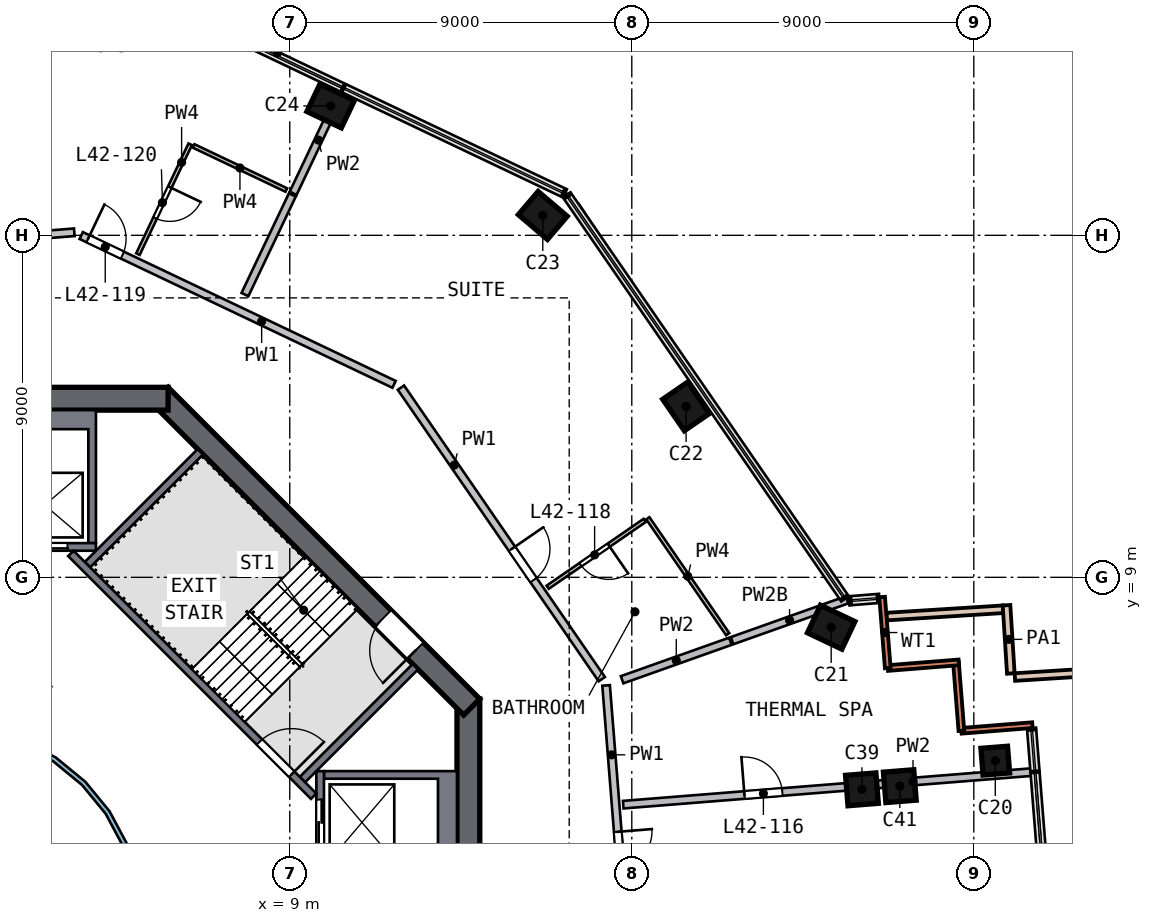
"""IFC4 building model, lengths in metres.
Left out: names, types, materials, properties, quantities, classifications, styles, units other than length and angle.
Written with IfcOpenShell. Run it as: python <this file> out.ifc"""

import sys

from ifc_helpers import new_model, si_unit, direction, frame, frame_2d, origin, origin_2d, place, context, subcontext, project, spatial, polyline, rectangle, outline, extrude, element, fill, save


model = new_model("IFC4")
c1 = context("Model", 3, precision=1e-05, world=origin(), true_north=direction((0.0, 1.0)))
c2 = subcontext(c1, "Body", "Model", "MODEL_VIEW")
j1 = project(units=[si_unit("LENGTHUNIT", "METRE"), si_unit("PLANEANGLEUNIT", "RADIAN")], contexts=[c1])
p1 = place(None, origin())
s1 = spatial("IfcSite", under=j1, at=p1, CompositionType="ELEMENT")
p2 = place(p1, origin())
s2 = spatial("IfcBuilding", under=s1, at=p2, CompositionType="ELEMENT")
p3 = place(p2, frame((0.0, 0.0, 175.0)))
s3 = spatial("IfcBuildingStorey", under=s2, at=p3, CompositionType="ELEMENT", Elevation=175.0)
p4 = place(p3, frame((27.583, 4.066, 0.0), z_axis=(-0.014357066, 0.091895591, 0.995665142), x_axis=(-0.078762263, 0.992569774, -0.09274562)))
e1 = element("IfcColumn", 1, at=p4, inside=s3, PredefinedType="COLUMN", context=c2, shape_type="SweptSolid", body=[
    extrude(rectangle(XDim=0.7, YDim=0.7, at=origin_2d()), origin(), (0.0, 0.0, 1.0), 4.71),
])
p5 = place(p3, frame((23.278, 7.595, 0.0), z_axis=(-0.025992865, 0.077511656, 0.996652554), x_axis=(0.902933505, -0.426026157, 0.05668156)))
e2 = element("IfcColumn", 2, at=p5, inside=s3, PredefinedType="COLUMN", context=c2, shape_type="SweptSolid", body=[
    extrude(rectangle(XDim=1.0, YDim=0.8, at=origin_2d()), origin(), (0.0, 0.0, 1.0), 4.706),
])
p6 = place(p3, frame((19.483, 13.421, 0.0), z_axis=(-0.045354859, 0.064711109, 0.996872815), x_axis=(-0.565250312, 0.821126017, -0.079019933)))
e3 = element("IfcColumn", 3, at=p6, inside=s3, PredefinedType="COLUMN", context=c2, shape_type="SweptSolid", body=[
    extrude(rectangle(XDim=1.0, YDim=0.8, at=origin_2d()), origin(), (0.0, 0.0, 1.0), 4.705),
])
p7 = place(p3, frame((15.733, 18.46, 0.0), z_axis=(-0.062106409, 0.052040708, 0.996711873), x_axis=(0.758540649, -0.646568718, 0.081024549)))
e4 = element("IfcColumn", 4, at=p7, inside=s3, PredefinedType="COLUMN", context=c2, shape_type="SweptSolid", body=[
    extrude(rectangle(XDim=1.0, YDim=0.8, at=origin_2d()), origin(), (0.0, 0.0, 1.0), 4.705),
])
p8 = place(p3, frame((10.163, 21.364, 0.0), z_axis=(-0.071664662, 0.033367399, 0.9968705), x_axis=(-0.90013564, 0.428377245, -0.079049135)))
e5 = element("IfcColumn", 5, at=p8, inside=s3, PredefinedType="COLUMN", context=c2, shape_type="SweptSolid", body=[
    extrude(rectangle(XDim=1.0, YDim=0.8, at=origin_2d()), origin(), (0.0, 0.0, 1.0), 4.705),
])
p9 = place(p3, frame((24.07, 3.324, 0.0), z_axis=(-0.011777813, 0.080265538, 0.996703931), x_axis=(0.996779302, 0.08001601, 0.005334937)))
e6 = element("IfcColumn", 6, at=p9, inside=s3, PredefinedType="COLUMN", context=c2, shape_type="SweptSolid", body=[
    extrude(rectangle(XDim=0.8, YDim=0.8, at=origin_2d()), origin(), (0.0, 0.0, 1.0), 4.706),
])
p10 = place(p3, frame((25.067, 3.404, 0.0), z_axis=(-0.012085789, 0.083563115, 0.996429194), x_axis=(0.996760191, 0.08025208, 0.005359658)))
e7 = element("IfcColumn", 7, at=p10, inside=s3, PredefinedType="COLUMN", context=c2, shape_type="SweptSolid", body=[
    extrude(rectangle(XDim=0.8, YDim=0.8, at=origin_2d()), origin(), (0.0, 0.0, 1.0), 4.707),
])
p11 = place(p3, frame((13.7, -5.799, 0.0), z_axis=(0.0, 0.0, 1.0), x_axis=(0.0, 1.0, 0.0)))
e8 = element("IfcWall", 8, at=p11, inside=s3, PredefinedType="SHEAR", context=c2, shape_type="SweptSolid", body=[
    extrude(rectangle(XDim=11.598, YDim=0.6, at=frame_2d((5.799, 0.0))), origin(), (0.0, 0.0, 1.0), 5.0),
])
p12 = place(p11, frame((4.899, 0.0, 0.0)))
e9 = element("IfcOpeningElement", 9, at=p12, cuts=e8, PredefinedType="OPENING", context=c2, shape_type="SweptSolid", body=[
    extrude(rectangle(XDim=1.8, YDim=2.1, at=frame_2d((0.9, 1.05))), frame((0.0, 0.31, 0.0), z_axis=(0.0, -1.0, 0.0), x_axis=(1.0, 0.0, 0.0)), (0.0, 0.0, 1.0), 0.62),
])
p13 = place(p3, frame((13.788, 5.587, 0.0), z_axis=(0.0, 0.0, 1.0), x_axis=(-0.707106781, 0.707106781, 0.0)))
e10 = element("IfcWall", 10, at=p13, inside=s3, PredefinedType="SHEAR", context=c2, shape_type="SweptSolid", body=[
    extrude(rectangle(XDim=11.598, YDim=0.6, at=frame_2d((5.799, 0.0))), origin(), (0.0, 0.0, 1.0), 5.0),
])
p14 = place(p13, frame((2.099, 0.0, 0.0)))
e11 = element("IfcOpeningElement", 11, at=p14, cuts=e10, PredefinedType="OPENING", context=c2, shape_type="SweptSolid", body=[
    extrude(rectangle(XDim=1.2, YDim=2.1, at=frame_2d((0.6, 1.05))), frame((0.0, 0.31, 0.0), z_axis=(0.0, -1.0, 0.0), x_axis=(1.0, 0.0, 0.0)), (0.0, 0.0, 1.0), 0.62),
])
p15 = place(p3, frame((5.799, 13.7, 0.0), z_axis=(0.0, 0.0, 1.0), x_axis=(-1.0, 0.0, 0.0)))
e12 = element("IfcWall", 12, at=p15, inside=s3, PredefinedType="SHEAR", context=c2, shape_type="SweptSolid", body=[
    extrude(rectangle(XDim=11.598, YDim=0.6, at=frame_2d((5.799, 0.0))), origin(), (0.0, 0.0, 1.0), 5.0),
])
p16 = place(p15, frame((4.899, 0.0, 0.0)))
e13 = element("IfcOpeningElement", 13, at=p16, cuts=e12, PredefinedType="OPENING", context=c2, shape_type="SweptSolid", body=[
    extrude(rectangle(XDim=1.8, YDim=2.1, at=frame_2d((0.9, 1.05))), frame((0.0, 0.31, 0.0), z_axis=(0.0, -1.0, 0.0), x_axis=(1.0, 0.0, 0.0)), (0.0, 0.0, 1.0), 0.62),
])
p17 = place(p3, frame((28.542, 5.11, 0.0), z_axis=(0.0, 0.0, 1.0), x_axis=(-0.996840895, -0.079424366, 0.0)))
e14 = element("IfcWall", 14, at=p17, inside=s3, PredefinedType="SOLIDWALL", context=c2, shape_type="SweptSolid", body=[
    extrude(rectangle(XDim=1.875, YDim=0.15, at=frame_2d((0.938, 0.0))), origin(), (0.0, 0.0, 1.0), 4.69),
])
p18 = place(p3, frame((26.673, 4.961, 0.0), z_axis=(0.0, 0.0, 1.0), x_axis=(-0.079486442, 0.996835947, 0.0)))
e15 = element("IfcWall", 15, at=p18, inside=s3, PredefinedType="SOLIDWALL", context=c2, shape_type="SweptSolid", body=[
    extrude(rectangle(XDim=1.8, YDim=0.15, at=frame_2d((0.9, 0.0))), origin(), (0.0, 0.0, 1.0), 4.69),
])
for number, where, z_axis, x_axis in (
    (16, (26.605, 6.761, 0.0), (0.0, 0.0, 1.0), (-0.997, -0.079, 0.0)),
    (17, (24.736, 6.613, 0.0), (0.0, 0.0, 1.0), (-0.079, 0.997, 0.0)),
):
    element("IfcWall", number, at=place(p3, frame(where, z_axis=z_axis, x_axis=x_axis)), inside=s3, PredefinedType="SOLIDWALL", context=c2, shape_type="SweptSolid", body=[
        extrude(rectangle(XDim=1.875, YDim=0.15, at=frame_2d((0.938, 0.0))), origin(), (0.0, 0.0, 1.0), 4.69),
    ])
p19 = place(p3, frame((29.677, 6.476, 0.0), z_axis=(0.0, 0.0, 1.0), x_axis=(-0.998031744, -0.062710755, 0.0)))
e18 = element("IfcWall", 18, at=p19, inside=s3, PredefinedType="PARAPET", context=c2, shape_type="SweptSolid", body=[
    extrude(rectangle(XDim=1.6, YDim=0.2, at=frame_2d((0.8, 0.0))), origin(), (0.0, 0.0, 1.0), 1.1),
])
p20 = place(p3, frame((27.974, 6.469, 0.0), z_axis=(0.0, 0.0, 1.0), x_axis=(-0.062800501, 0.9980261, 0.0)))
e19 = element("IfcWall", 19, at=p20, inside=s3, PredefinedType="PARAPET", context=c2, shape_type="SweptSolid", body=[
    extrude(rectangle(XDim=1.8, YDim=0.2, at=frame_2d((0.9, 0.0))), origin(), (0.0, 0.0, 1.0), 1.1),
])
p21 = place(p3, frame((27.767, 8.16, 0.0), z_axis=(0.0, 0.0, 1.0), x_axis=(-0.998023374, -0.062843812, 0.0)))
e20 = element("IfcWall", 20, at=p21, inside=s3, PredefinedType="PARAPET", context=c2, shape_type="SweptSolid", body=[
    extrude(rectangle(XDim=3.069, YDim=0.2, at=frame_2d((1.535, 0.0))), origin(), (0.0, 0.0, 1.0), 1.1),
])
p22 = place(p3, origin())
e21 = element("IfcWall", 21, at=p22, inside=s3, PredefinedType="SOLIDWALL", context=c2, shape_type="SweptSolid", body=[
    extrude(outline(polyline([(13.4, 3.9), (13.4, 1.2), (9.9, 1.2), (9.9, 1.4), (12.9, 1.4), (12.9, 3.7), (9.9, 3.7), (9.9, 3.9), (13.4, 3.9)])), origin(), (0.0, 0.0, 1.0), 4.69),
])
p23 = place(p3, frame((9.8, 1.2, 0.0), z_axis=(0.0, 0.0, 1.0), x_axis=(0.0, 1.0, 0.0)))
e22 = element("IfcWall", 22, at=p23, inside=s3, PredefinedType="SOLIDWALL", context=c2, shape_type="SweptSolid", body=[
    extrude(rectangle(XDim=2.7, YDim=0.2, at=frame_2d((1.35, 0.0))), origin(), (0.0, 0.0, 1.0), 4.69),
])
p24 = place(p23, frame((0.75, 0.0, 0.0)))
e23 = element("IfcOpeningElement", 23, at=p24, cuts=e22, PredefinedType="OPENING", context=c2, shape_type="SweptSolid", body=[
    extrude(rectangle(XDim=1.2, YDim=2.1, at=frame_2d((0.6, 1.05))), frame((0.0, 0.11, 0.0), z_axis=(0.0, -1.0, 0.0), x_axis=(1.0, 0.0, 0.0)), (0.0, 0.0, 1.0), 0.22),
])
p25 = place(p3, origin())
e24 = element("IfcWall", 24, at=p25, inside=s3, PredefinedType="SOLIDWALL", context=c2, shape_type="SweptSolid", body=[
    extrude(outline(polyline([(3.9, 9.9), (3.7, 9.9), (3.7, 12.9), (1.4, 12.9), (1.4, 9.9), (1.2, 9.9), (1.2, 13.4), (3.9, 13.4), (3.9, 9.9)])), origin(), (0.0, 0.0, 1.0), 4.69),
])
p26 = place(p3, frame((1.2, 9.8, 0.0), z_axis=(0.0, 0.0, 1.0), x_axis=(1.0, 0.0, 0.0)))
e25 = element("IfcWall", 25, at=p26, inside=s3, PredefinedType="SOLIDWALL", context=c2, shape_type="SweptSolid", body=[
    extrude(rectangle(XDim=2.7, YDim=0.2, at=frame_2d((1.35, 0.0))), origin(), (0.0, 0.0, 1.0), 4.69),
])
p27 = place(p26, frame((0.75, 0.0, 0.0)))
e26 = element("IfcOpeningElement", 26, at=p27, cuts=e25, PredefinedType="OPENING", context=c2, shape_type="SweptSolid", body=[
    extrude(rectangle(XDim=1.2, YDim=2.1, at=frame_2d((0.6, 1.05))), frame((0.0, 0.11, 0.0), z_axis=(0.0, -1.0, 0.0), x_axis=(1.0, 0.0, 0.0)), (0.0, 0.0, 1.0), 0.22),
])
p28 = place(p3, frame((3.24, 9.629, 0.0), z_axis=(0.0, 0.0, 1.0), x_axis=(0.707106781, -0.707106781, 0.0)))
e27 = element("IfcWall", 27, at=p28, inside=s3, PredefinedType="SOLIDWALL", context=c2, shape_type="SweptSolid", body=[
    extrude(rectangle(XDim=9.036, YDim=0.2, at=frame_2d((4.518, 0.0))), origin(), (0.0, 0.0, 1.0), 4.69),
])
p29 = place(p28, frame((7.018, 0.0, 0.0)))
e28 = element("IfcOpeningElement", 28, at=p29, cuts=e27, PredefinedType="OPENING", context=c2, shape_type="SweptSolid", body=[
    extrude(rectangle(XDim=1.2, YDim=2.1, at=frame_2d((0.6, 1.05))), frame((0.0, 0.11, 0.0), z_axis=(0.0, -1.0, 0.0), x_axis=(1.0, 0.0, 0.0)), (0.0, 0.0, 1.0), 0.22),
])
for number, where, z_axis, x_axis in (
    (29, (9.334, 3.677, 0.0), (0.0, 0.0, 1.0), (0.707, 0.707, 0.0)),
    (30, (3.677, 9.334, 0.0), (0.0, 0.0, 1.0), (0.707, 0.707, 0.0)),
):
    element("IfcWall", number, at=place(p3, frame(where, z_axis=z_axis, x_axis=x_axis)), inside=s3, PredefinedType="SOLIDWALL", context=c2, shape_type="SweptSolid", body=[
        extrude(rectangle(XDim=4.2, YDim=0.2, at=frame_2d((2.1, 0.0))), origin(), (0.0, 0.0, 1.0), 4.69),
    ])
p30 = place(p3, origin())
e31 = element("IfcWall", 31, at=p30, inside=s3, PredefinedType="SOLIDWALL", context=c2, shape_type="SweptSolid", body=[
    extrude(outline(polyline([(5.021, -0.999), (4.73, -1.959), (4.257, -2.844), (3.62, -3.62), (2.844, -4.257), (1.959, -4.73), (0.999, -5.021), (0.0, -5.12), (-0.999, -5.021), (-1.959, -4.73), (-2.844, -4.257), (-3.62, -3.62), (-4.257, -2.844), (-4.73, -1.959), (-5.021, -0.999), (-5.12, 0.0), (-5.021, 0.999), (-4.73, 1.959), (-4.257, 2.844), (-3.62, 3.62), (-2.844, 4.257), (-1.959, 4.73), (-0.999, 5.021), (0.0, 5.12), (0.999, 5.021), (1.959, 4.73), (2.844, 4.257), (3.62, 3.62), (4.257, 2.844), (4.73, 1.959), (5.021, 0.999), (5.12, 0.0), (5.021, -0.999)]), holes=[polyline([(4.904, 0.976), (4.619, 1.913), (4.157, 2.778), (3.535, 3.535), (2.778, 4.157), (1.913, 4.619), (0.976, 4.904), (0.0, 5.0), (-0.976, 4.904), (-1.913, 4.619), (-2.778, 4.157), (-3.535, 3.535), (-4.157, 2.778), (-4.619, 1.913), (-4.904, 0.976), (-5.0, 0.0), (-4.904, -0.976), (-4.619, -1.913), (-4.157, -2.778), (-3.535, -3.535), (-2.778, -4.157), (-1.913, -4.619), (-0.976, -4.904), (0.0, -5.0), (0.976, -4.904), (1.913, -4.619), (2.778, -4.157), (3.535, -3.535), (4.157, -2.778), (4.619, -1.913), (4.904, -0.976), (5.0, 0.0), (4.904, 0.976)])]), origin(), (0.0, 0.0, 1.0), 4.69),
])
p31 = place(p3, frame((3.331, 18.08, 0.0), z_axis=(0.0, 0.0, 1.0), x_axis=(-0.996834258, -0.079507628, 0.0)))
e32 = element("IfcWall", 32, at=p31, inside=s3, PredefinedType="SOLIDWALL", context=c2, shape_type="SweptSolid", body=[
    extrude(rectangle(XDim=9.516, YDim=0.2, at=frame_2d((4.758, 0.0))), origin(), (0.0, 0.0, 1.0), 4.69),
])
p32 = place(p3, frame((3.512, 17.994, 0.0), z_axis=(0.0, 0.0, 1.0), x_axis=(0.903034211, -0.429568636, 0.0)))
e33 = element("IfcWall", 33, at=p32, inside=s3, PredefinedType="SOLIDWALL", context=c2, shape_type="SweptSolid", body=[
    extrude(rectangle(XDim=9.115, YDim=0.2, at=frame_2d((4.558, 0.0))), origin(), (0.0, 0.0, 1.0), 4.69),
])
p33 = place(p32, frame((0.2, 0.0, 0.0)))
e34 = element("IfcOpeningElement", 34, at=p33, cuts=e33, PredefinedType="OPENING", context=c2, shape_type="SweptSolid", body=[
    extrude(rectangle(XDim=1.0, YDim=2.1, at=frame_2d((0.5, 1.05))), frame((0.0, 0.11, 0.0), z_axis=(0.0, -1.0, 0.0), x_axis=(1.0, 0.0, 0.0)), (0.0, 0.0, 1.0), 0.22),
])
p34 = place(p3, frame((11.926, 13.992, 0.0), z_axis=(0.0, 0.0, 1.0), x_axis=(0.567263767, -0.823536167, 0.0)))
e35 = element("IfcWall", 35, at=p34, inside=s3, PredefinedType="SOLIDWALL", context=c2, shape_type="SweptSolid", body=[
    extrude(rectangle(XDim=9.316, YDim=0.2, at=frame_2d((4.658, 0.0))), origin(), (0.0, 0.0, 1.0), 4.69),
])
p35 = place(p34, frame((5.15, 0.0, 0.0)))
e36 = element("IfcOpeningElement", 36, at=p35, cuts=e35, PredefinedType="OPENING", context=c2, shape_type="SweptSolid", body=[
    extrude(rectangle(XDim=1.0, YDim=2.1, at=frame_2d((0.5, 1.05))), frame((0.0, 0.11, 0.0), z_axis=(0.0, -1.0, 0.0), x_axis=(1.0, 0.0, 0.0)), (0.0, 0.0, 1.0), 0.22),
])
p36 = place(p3, frame((17.324, 6.155, 0.0), z_axis=(0.0, 0.0, 1.0), x_axis=(0.079505668, -0.996834414, 0.0)))
e37 = element("IfcWall", 37, at=p36, inside=s3, PredefinedType="SOLIDWALL", context=c2, shape_type="SweptSolid", body=[
    extrude(rectangle(XDim=9.317, YDim=0.2, at=frame_2d((4.658, 0.0))), origin(), (0.0, 0.0, 1.0), 4.69),
])
p37 = place(p36, frame((3.864, 0.0, 0.0)))
e38 = element("IfcOpeningElement", 38, at=p37, cuts=e37, PredefinedType="OPENING", context=c2, shape_type="SweptSolid", body=[
    extrude(rectangle(XDim=1.8, YDim=2.1, at=frame_2d((0.9, 1.05))), frame((0.0, 0.11, 0.0), z_axis=(0.0, -1.0, 0.0), x_axis=(1.0, 0.0, 0.0)), (0.0, 0.0, 1.0), 0.22),
])
p38 = place(p3, frame((7.821, 16.44, 0.0), z_axis=(0.0, 0.0, 1.0), x_axis=(0.429545326, 0.9030453, 0.0)))
e39 = element("IfcWall", 39, at=p38, inside=s3, PredefinedType="SOLIDWALL", context=c2, shape_type="SweptSolid", body=[
    extrude(rectangle(XDim=2.905, YDim=0.2, at=frame_2d((1.453, 0.0))), origin(), (0.0, 0.0, 1.0), 4.69),
])
p39 = place(p3, frame((9.088, 19.105, 0.0), z_axis=(0.0, 0.0, 1.0), x_axis=(0.429591364, 0.9030234, 0.0)))
e40 = element("IfcWall", 40, at=p39, inside=s3, PredefinedType="SOLIDWALL", context=c2, shape_type="SweptSolid", body=[
    extrude(rectangle(XDim=3.102, YDim=0.2, at=frame_2d((1.551, 0.0))), origin(), (0.0, 0.0, 1.0), 4.69),
])
p40 = place(p3, frame((17.745, 6.305, 0.0), z_axis=(0.0, 0.0, 1.0), x_axis=(0.942293924, 0.33478674, 0.0)))
e41 = element("IfcWall", 41, at=p40, inside=s3, PredefinedType="SOLIDWALL", context=c2, shape_type="SweptSolid", body=[
    extrude(rectangle(XDim=3.025, YDim=0.2, at=frame_2d((1.512, 0.0))), origin(), (0.0, 0.0, 1.0), 4.69),
])
p41 = place(p3, frame((20.639, 7.333, 0.0), z_axis=(0.0, 0.0, 1.0), x_axis=(0.942313304, 0.334732188, 0.0)))
e42 = element("IfcWall", 42, at=p41, inside=s3, PredefinedType="SOLIDWALL", context=c2, shape_type="SweptSolid", body=[
    extrude(rectangle(XDim=3.211, YDim=0.2, at=frame_2d((1.606, 0.0))), origin(), (0.0, 0.0, 1.0), 4.19),
])
p42 = place(p3, frame((17.775, 3.017, 0.0), z_axis=(0.0, 0.0, 1.0), x_axis=(0.996833768, 0.07951376, 0.0)))
e43 = element("IfcWall", 43, at=p42, inside=s3, PredefinedType="SOLIDWALL", context=c2, shape_type="SweptSolid", body=[
    extrude(rectangle(XDim=10.9, YDim=0.2, at=frame_2d((5.45, 0.0))), origin(), (0.0, 0.0, 1.0), 4.69),
])
p43 = place(p42, frame((3.2, 0.0, 0.0)))
e44 = element("IfcOpeningElement", 44, at=p43, cuts=e43, PredefinedType="OPENING", context=c2, shape_type="SweptSolid", body=[
    extrude(rectangle(XDim=1.0, YDim=2.1, at=frame_2d((0.5, 1.05))), frame((0.0, 0.11, 0.0), z_axis=(0.0, -1.0, 0.0), x_axis=(1.0, 0.0, 0.0)), (0.0, 0.0, 1.0), 0.22),
])
p44 = place(p3, frame((6.38, 20.396, 0.0), z_axis=(0.0, 0.0, 1.0), x_axis=(-0.429581153, -0.903028257, 0.0)))
e45 = element("IfcWall", 45, at=p44, inside=s3, PredefinedType="PARTITIONING", context=c2, shape_type="SweptSolid", body=[
    extrude(rectangle(XDim=3.2, YDim=0.1, at=frame_2d((1.6, 0.0))), origin(), (0.0, 0.0, 1.0), 4.69),
])
p45 = place(p44, frame((1.25, 0.0, 0.0)))
e46 = element("IfcOpeningElement", 46, at=p45, cuts=e45, PredefinedType="OPENING", context=c2, shape_type="SweptSolid", body=[
    extrude(rectangle(XDim=0.9, YDim=2.1, at=frame_2d((0.45, 1.05))), frame((0.0, 0.06, 0.0), z_axis=(0.0, -1.0, 0.0), x_axis=(1.0, 0.0, 0.0)), (0.0, 0.0, 1.0), 0.12),
])
p46 = place(p3, frame((6.47, 20.353, 0.0), z_axis=(0.0, 0.0, 1.0), x_axis=(0.903009227, -0.429621153, 0.0)))
e47 = element("IfcWall", 47, at=p46, inside=s3, PredefinedType="PARTITIONING", context=c2, shape_type="SweptSolid", body=[
    extrude(rectangle(XDim=2.7, YDim=0.1, at=frame_2d((1.35, 0.0))), origin(), (0.0, 0.0, 1.0), 4.69),
])
p47 = place(p3, frame((18.34, 10.498, 0.0), z_axis=(0.0, 0.0, 1.0), x_axis=(-0.823533764, -0.567267256, 0.0)))
e48 = element("IfcWall", 48, at=p47, inside=s3, PredefinedType="PARTITIONING", context=c2, shape_type="SweptSolid", body=[
    extrude(rectangle(XDim=3.1, YDim=0.1, at=frame_2d((1.55, 0.0))), origin(), (0.0, 0.0, 1.0), 4.69),
])
p48 = place(p47, frame((1.15, 0.0, 0.0)))
e49 = element("IfcOpeningElement", 49, at=p48, cuts=e48, PredefinedType="OPENING", context=c2, shape_type="SweptSolid", body=[
    extrude(rectangle(XDim=0.9, YDim=2.1, at=frame_2d((0.45, 1.05))), frame((0.0, 0.06, 0.0), z_axis=(0.0, -1.0, 0.0), x_axis=(1.0, 0.0, 0.0)), (0.0, 0.0, 1.0), 0.12),
])
p49 = place(p3, frame((18.422, 10.554, 0.0), z_axis=(0.0, 0.0, 1.0), x_axis=(0.567261528, -0.82353771, 0.0)))
e50 = element("IfcWall", 50, at=p49, inside=s3, PredefinedType="PARTITIONING", context=c2, shape_type="SweptSolid", body=[
    extrude(rectangle(XDim=3.704, YDim=0.1, at=frame_2d((1.852, 0.0))), origin(), (0.0, 0.0, 1.0), 4.69),
])
p50 = place(p24, origin())
e51 = element("IfcDoor", 51, at=p50, inside=s3, OperationType="DOUBLE_DOOR_SLIDING", PredefinedType="DOOR", context=c2, shape_type="SweptSolid", body=[
    extrude(rectangle(XDim=1.2, YDim=2.1, at=frame_2d((0.6, 1.05))), frame((0.0, 0.025, 0.0), z_axis=(0.0, -1.0, 0.0), x_axis=(1.0, 0.0, 0.0)), (0.0, 0.0, 1.0), 0.05),
])
fill(e23, e51)
p51 = place(p27, origin())
e52 = element("IfcDoor", 52, at=p51, inside=s3, OperationType="DOUBLE_DOOR_SLIDING", PredefinedType="DOOR", context=c2, shape_type="SweptSolid", body=[
    extrude(rectangle(XDim=1.2, YDim=2.1, at=frame_2d((0.6, 1.05))), frame((0.0, 0.025, 0.0), z_axis=(0.0, -1.0, 0.0), x_axis=(1.0, 0.0, 0.0)), (0.0, 0.0, 1.0), 0.05),
])
fill(e26, e52)
p52 = place(p29, origin())
e53 = element("IfcDoor", 53, at=p52, inside=s3, OperationType="SINGLE_SWING_RIGHT", PredefinedType="DOOR", context=c2, shape_type="SweptSolid", body=[
    extrude(rectangle(XDim=1.2, YDim=2.1, at=frame_2d((0.6, 1.05))), frame((0.0, 0.025, 0.0), z_axis=(0.0, -1.0, 0.0), x_axis=(1.0, 0.0, 0.0)), (0.0, 0.0, 1.0), 0.05),
])
fill(e28, e53)
p53 = place(p14, origin())
e54 = element("IfcDoor", 54, at=p53, inside=s3, OperationType="SINGLE_SWING_LEFT", PredefinedType="DOOR", context=c2, shape_type="SweptSolid", body=[
    extrude(rectangle(XDim=1.2, YDim=2.1, at=frame_2d((0.6, 1.05))), frame((0.0, 0.025, 0.0), z_axis=(0.0, -1.0, 0.0), x_axis=(1.0, 0.0, 0.0)), (0.0, 0.0, 1.0), 0.05),
])
fill(e11, e54)
p54 = place(p37, origin())
e55 = element("IfcDoor", 55, at=p54, inside=s3, OperationType="DOUBLE_DOOR_SINGLE_SWING", PredefinedType="DOOR", context=c2, shape_type="SweptSolid", body=[
    extrude(rectangle(XDim=1.8, YDim=2.1, at=frame_2d((0.9, 1.05))), frame((0.0, 0.025, 0.0), z_axis=(0.0, -1.0, 0.0), x_axis=(1.0, 0.0, 0.0)), (0.0, 0.0, 1.0), 0.05),
])
fill(e38, e55)
p55 = place(p43, origin())
e56 = element("IfcDoor", 56, at=p55, inside=s3, OperationType="SINGLE_SWING_LEFT", PredefinedType="DOOR", context=c2, shape_type="SweptSolid", body=[
    extrude(rectangle(XDim=1.0, YDim=2.1, at=frame_2d((0.5, 1.05))), frame((0.0, 0.025, 0.0), z_axis=(0.0, -1.0, 0.0), x_axis=(1.0, 0.0, 0.0)), (0.0, 0.0, 1.0), 0.05),
])
fill(e44, e56)
p56 = place(p35, origin())
e57 = element("IfcDoor", 57, at=p56, inside=s3, OperationType="SINGLE_SWING_LEFT", PredefinedType="DOOR", context=c2, shape_type="SweptSolid", body=[
    extrude(rectangle(XDim=1.0, YDim=2.1, at=frame_2d((0.5, 1.05))), frame((0.0, 0.025, 0.0), z_axis=(0.0, -1.0, 0.0), x_axis=(1.0, 0.0, 0.0)), (0.0, 0.0, 1.0), 0.05),
])
fill(e36, e57)
p57 = place(p48, origin())
e58 = element("IfcDoor", 58, at=p57, inside=s3, OperationType="SINGLE_SWING_LEFT", PredefinedType="DOOR", context=c2, shape_type="SweptSolid", body=[
    extrude(rectangle(XDim=0.9, YDim=2.1, at=frame_2d((0.45, 1.05))), frame((0.0, 0.025, 0.0), z_axis=(0.0, -1.0, 0.0), x_axis=(1.0, 0.0, 0.0)), (0.0, 0.0, 1.0), 0.05),
])
fill(e49, e58)
p58 = place(p33, origin())
e59 = element("IfcDoor", 59, at=p58, inside=s3, OperationType="SINGLE_SWING_LEFT", PredefinedType="DOOR", context=c2, shape_type="SweptSolid", body=[
    extrude(rectangle(XDim=1.0, YDim=2.1, at=frame_2d((0.5, 1.05))), frame((0.0, 0.025, 0.0), z_axis=(0.0, -1.0, 0.0), x_axis=(1.0, 0.0, 0.0)), (0.0, 0.0, 1.0), 0.05),
])
fill(e34, e59)
p59 = place(p45, origin())
e60 = element("IfcDoor", 60, at=p59, inside=s3, OperationType="SINGLE_SWING_LEFT", PredefinedType="DOOR", context=c2, shape_type="SweptSolid", body=[
    extrude(rectangle(XDim=0.9, YDim=2.1, at=frame_2d((0.45, 1.05))), frame((0.0, 0.025, 0.0), z_axis=(0.0, -1.0, 0.0), x_axis=(1.0, 0.0, 0.0)), (0.0, 0.0, 1.0), 0.05),
])
fill(e46, e60)
save(model, sys.argv[1])
